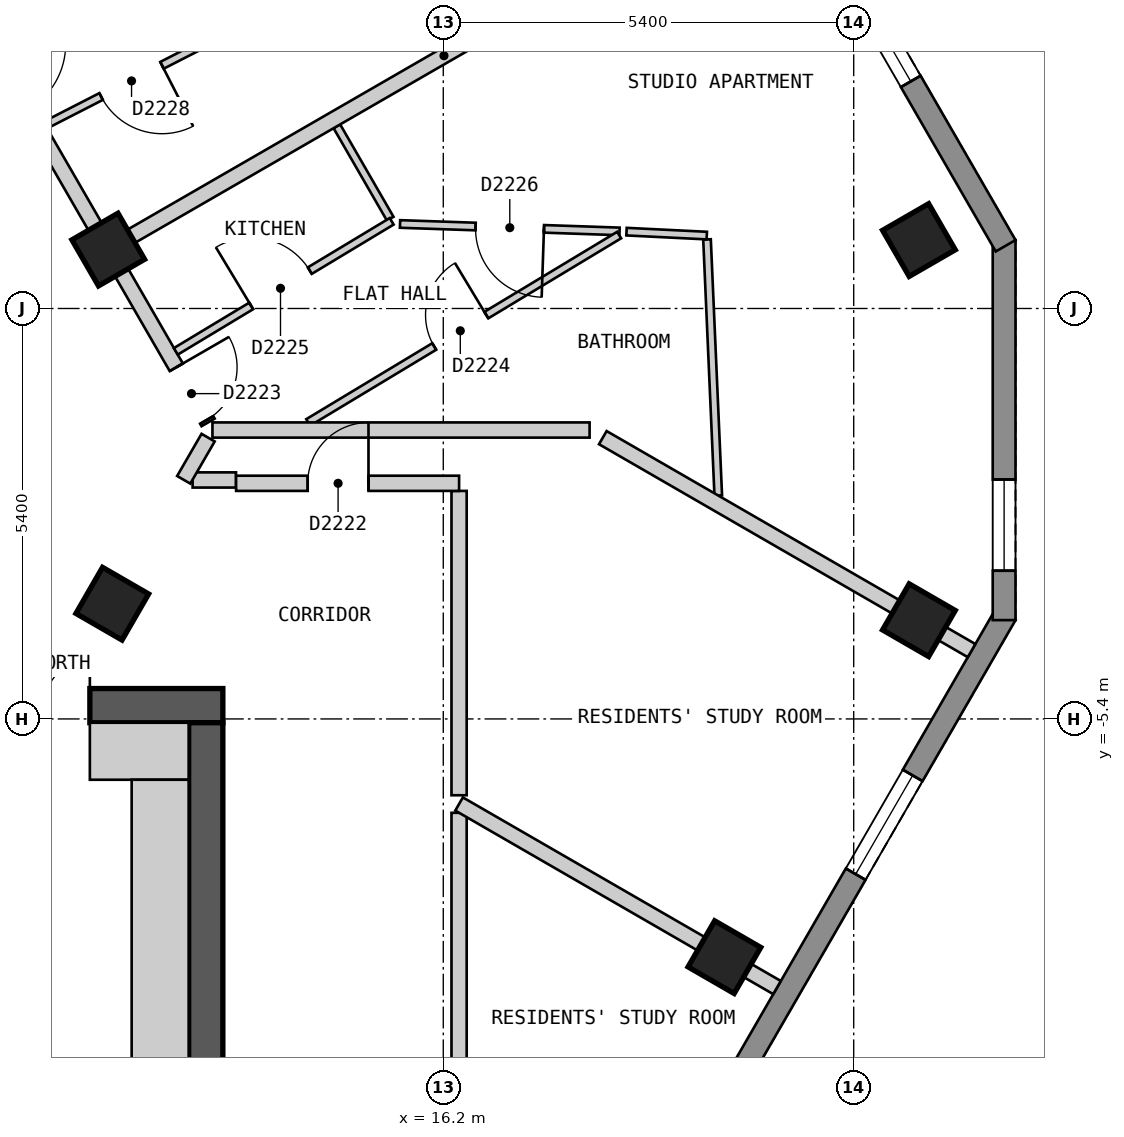
"""IFC4 building model, lengths in metres.
Left out: names, types, materials, properties, quantities, classifications, styles, units other than length and angle.
Written with IfcOpenShell. Run it as: python <this file> out.ifc"""

import sys

from ifc_helpers import new_model, si_unit, direction, frame, frame_2d, origin, origin_2d, place, context, subcontext, project, spatial, polyline, rectangle, outline, extrude, element, fill, save


model = new_model("IFC4")
c1 = context("Model", 3, precision=1e-05, world=origin(), true_north=direction((0.0, 1.0)))
c2 = subcontext(c1, "Body", "Model", "MODEL_VIEW")
j1 = project(units=[si_unit("LENGTHUNIT", "METRE"), si_unit("PLANEANGLEUNIT", "RADIAN")], contexts=[c1])
p1 = place(None, origin())
s1 = spatial("IfcSite", under=j1, at=p1, CompositionType="ELEMENT")
p2 = place(p1, origin())
s2 = spatial("IfcBuilding", under=s1, at=p2, CompositionType="ELEMENT")
p3 = place(p2, frame((0.0, 0.0, 235.8)))
s3 = spatial("IfcBuildingStorey", under=s2, at=p3, CompositionType="ELEMENT", Elevation=235.8)
for number, where, z_axis, x_axis in (
    (1, (19.899, -8.534, 0.0), (0.0, 0.0, 1.0), (0.5, 0.866, 0.0)),
    (2, (22.458, -4.101, 0.0), (0.0, 0.0, 1.0), (0.5, 0.866, 0.0)),
    (3, (22.458, 0.9, 0.0), (0.0, 0.0, 1.0), (-0.5, 0.866, 0.0)),
    (4, (11.845, -3.884, 0.0), (0.0, 0.0, 1.0), (0.5, 0.866, 0.0)),
    (5, (11.792, 0.775, 0.0), (0.0, 0.0, 1.0), (-0.5, 0.866, 0.0)),
):
    element("IfcColumn", number, at=place(p3, frame(where, z_axis=z_axis, x_axis=x_axis)), inside=s3, PredefinedType="COLUMN", context=c2, shape_type="SweptSolid", body=[
        extrude(rectangle(XDim=0.7, YDim=0.7, at=origin_2d()), origin(), (0.0, 0.0, 1.0), 3.0),
    ])
p4 = place(p3, frame((-13.3, -5.225, 0.0), z_axis=(0.0, 0.0, 1.0), x_axis=(1.0, 0.0, 0.0)))
e6 = element("IfcWall", 6, at=p4, inside=s3, PredefinedType="SHEAR", context=c2, shape_type="SweptSolid", body=[
    extrude(rectangle(XDim=26.6, YDim=0.45, at=frame_2d((13.3, 0.0))), origin(), (0.0, 0.0, 1.0), 2.7),
])
p5 = place(p4, frame((23.65, 0.0, 0.0)))
e7 = element("IfcOpeningElement", 7, at=p5, cuts=e6, PredefinedType="OPENING", context=c2, shape_type="SweptSolid", body=[
    extrude(rectangle(XDim=1.2, YDim=2.1, at=frame_2d((0.6, 1.05))), frame((0.0, 0.235, 0.0), z_axis=(0.0, -1.0, 0.0), x_axis=(1.0, 0.0, 0.0)), (0.0, 0.0, 1.0), 0.47),
])
p6 = place(p3, frame((13.075, -18.55, 0.0), z_axis=(0.0, 0.0, 1.0), x_axis=(0.0, 1.0, 0.0)))
e8 = element("IfcWall", 8, at=p6, inside=s3, PredefinedType="SHEAR", context=c2, shape_type="SweptSolid", body=[
    extrude(rectangle(XDim=13.1, YDim=0.45, at=frame_2d((6.55, 0.0))), origin(), (0.0, 0.0, 1.0), 2.7),
])
p7 = place(p3, frame((15.285, -18.425, 0.0), z_axis=(0.0, 0.0, 1.0), x_axis=(0.500012653391, 0.866018098222, 0.0)))
e9 = element("IfcWall", 9, at=p7, inside=s3, PredefinedType="SOLIDWALL", context=c2, shape_type="SweptSolid", body=[
    extrude(outline(polyline([(0.0, -0.15), (16.628, -0.15), (16.548, 0.15), (0.08, 0.15), (0.0, -0.15)])), origin(), (0.0, 0.0, 1.0), 2.7),
])
p8 = place(p7, frame((2.444, 0.0, 0.15)))
e10 = element("IfcOpeningElement", 10, at=p8, cuts=e9, PredefinedType="OPENING", context=c2, shape_type="SweptSolid", body=[
    extrude(rectangle(XDim=1.5, YDim=2.1, at=frame_2d((0.75, 1.05))), frame((0.0, 0.16, 0.0), z_axis=(0.0, -1.0, 0.0), x_axis=(1.0, 0.0, 0.0)), (0.0, 0.0, 1.0), 0.32),
])
p9 = place(p7, frame((7.564, 0.0, 0.15)))
e11 = element("IfcOpeningElement", 11, at=p9, cuts=e9, PredefinedType="OPENING", context=c2, shape_type="SweptSolid", body=[
    extrude(rectangle(XDim=1.5, YDim=2.1, at=frame_2d((0.75, 1.05))), frame((0.0, 0.16, 0.0), z_axis=(0.0, -1.0, 0.0), x_axis=(1.0, 0.0, 0.0)), (0.0, 0.0, 1.0), 0.32),
])
p10 = place(p7, frame((12.682, 0.0, 0.15)))
e12 = element("IfcOpeningElement", 12, at=p10, cuts=e9, PredefinedType="OPENING", context=c2, shape_type="SweptSolid", body=[
    extrude(rectangle(XDim=1.5, YDim=2.1, at=frame_2d((0.75, 1.05))), frame((0.0, 0.16, 0.0), z_axis=(0.0, -1.0, 0.0), x_axis=(1.0, 0.0, 0.0)), (0.0, 0.0, 1.0), 0.32),
])
p11 = place(p3, frame((23.579, -4.1, 0.0), z_axis=(0.0, 0.0, 1.0), x_axis=(0.0, 1.0, 0.0)))
e13 = element("IfcWall", 13, at=p11, inside=s3, PredefinedType="SOLIDWALL", context=c2, shape_type="SweptSolid", body=[
    extrude(outline(polyline([(0.0, -0.15), (5.0, -0.15), (4.92, 0.15), (0.08, 0.15), (0.0, -0.15)])), origin(), (0.0, 0.0, 1.0), 2.7),
])
p12 = place(p11, frame((0.65, 0.0, 0.15)))
e14 = element("IfcOpeningElement", 14, at=p12, cuts=e13, PredefinedType="OPENING", context=c2, shape_type="SweptSolid", body=[
    extrude(rectangle(XDim=1.2, YDim=2.1, at=frame_2d((0.6, 1.05))), frame((0.0, 0.16, 0.0), z_axis=(0.0, -1.0, 0.0), x_axis=(1.0, 0.0, 0.0)), (0.0, 0.0, 1.0), 0.32),
])
p13 = place(p3, frame((23.599, 0.825, 0.0), z_axis=(0.0, 0.0, 1.0), x_axis=(-0.500003656944, 0.866023292436, 0.0)))
e15 = element("IfcWall", 15, at=p13, inside=s3, PredefinedType="SOLIDWALL", context=c2, shape_type="SweptSolid", body=[
    extrude(outline(polyline([(0.0, -0.15), (22.17, -0.15), (22.09, 0.15), (0.08, 0.15), (0.0, -0.15)])), origin(), (0.0, 0.0, 1.0), 2.7),
])
p14 = place(p13, frame((2.497, 0.0, 0.15)))
e16 = element("IfcOpeningElement", 16, at=p14, cuts=e15, PredefinedType="OPENING", context=c2, shape_type="SweptSolid", body=[
    extrude(rectangle(XDim=1.5, YDim=2.1, at=frame_2d((0.75, 1.05))), frame((0.0, 0.16, 0.0), z_axis=(0.0, -1.0, 0.0), x_axis=(1.0, 0.0, 0.0)), (0.0, 0.0, 1.0), 0.32),
])
p15 = place(p13, frame((7.723, 0.0, 0.15)))
e17 = element("IfcOpeningElement", 17, at=p15, cuts=e15, PredefinedType="OPENING", context=c2, shape_type="SweptSolid", body=[
    extrude(rectangle(XDim=1.5, YDim=2.1, at=frame_2d((0.75, 1.05))), frame((0.0, 0.16, 0.0), z_axis=(0.0, -1.0, 0.0), x_axis=(1.0, 0.0, 0.0)), (0.0, 0.0, 1.0), 0.32),
])
p16 = place(p13, frame((12.948, 0.0, 0.15)))
e18 = element("IfcOpeningElement", 18, at=p16, cuts=e15, PredefinedType="OPENING", context=c2, shape_type="SweptSolid", body=[
    extrude(rectangle(XDim=1.5, YDim=2.1, at=frame_2d((0.75, 1.05))), frame((0.0, 0.16, 0.0), z_axis=(0.0, -1.0, 0.0), x_axis=(1.0, 0.0, 0.0)), (0.0, 0.0, 1.0), 0.32),
])
p17 = place(p13, frame((18.173, 0.0, 0.15)))
e19 = element("IfcOpeningElement", 19, at=p17, cuts=e15, PredefinedType="OPENING", context=c2, shape_type="SweptSolid", body=[
    extrude(rectangle(XDim=1.5, YDim=2.1, at=frame_2d((0.75, 1.05))), frame((0.0, 0.16, 0.0), z_axis=(0.0, -1.0, 0.0), x_axis=(1.0, 0.0, 0.0)), (0.0, 0.0, 1.0), 0.32),
])
p18 = place(p3, frame((9.238, 5.2, 0.0), z_axis=(0.0, 0.0, 1.0), x_axis=(0.500025705601, -0.86601056214, 0.0)))
e20 = element("IfcWall", 20, at=p18, inside=s3, PredefinedType="PARTITIONING", context=c2, shape_type="SweptSolid", body=[
    extrude(rectangle(XDim=7.735, YDim=0.2, at=frame_2d((3.868, 0.0))), origin(), (0.0, 0.0, 1.0), 2.7),
])
p19 = place(p18, frame((6.898, 0.0, 0.0)))
e21 = element("IfcOpeningElement", 21, at=p19, cuts=e20, PredefinedType="OPENING", context=c2, shape_type="SweptSolid", body=[
    extrude(rectangle(XDim=0.8, YDim=2.1, at=frame_2d((0.4, 1.05))), frame((0.0, 0.11, 0.0), z_axis=(0.0, -1.0, 0.0), x_axis=(1.0, 0.0, 0.0)), (0.0, 0.0, 1.0), 0.22),
])
p20 = place(p18, frame((1.988, 0.0, 0.0)))
e22 = element("IfcOpeningElement", 22, at=p20, cuts=e20, PredefinedType="OPENING", context=c2, shape_type="SweptSolid", body=[
    extrude(rectangle(XDim=1.0, YDim=2.1, at=frame_2d((0.5, 1.05))), frame((0.0, 0.11, 0.0), z_axis=(0.0, -1.0, 0.0), x_axis=(1.0, 0.0, 0.0)), (0.0, 0.0, 1.0), 0.22),
])
p21 = place(p3, frame((16.408, -2.4, 0.0), z_axis=(0.0, 0.0, 1.0), x_axis=(0.0, -1.0, 0.0)))
e23 = element("IfcWall", 23, at=p21, inside=s3, PredefinedType="PARTITIONING", context=c2, shape_type="SweptSolid", body=[
    extrude(rectangle(XDim=4.004, YDim=0.2, at=frame_2d((2.002, 0.0))), origin(), (0.0, 0.0, 1.0), 2.7),
])
p22 = place(p3, frame((12.902, -2.256, 0.0), z_axis=(0.0, 0.0, 1.0), x_axis=(1.0, 0.0, 0.0)))
e24 = element("IfcWall", 24, at=p22, inside=s3, PredefinedType="PARTITIONING", context=c2, shape_type="SweptSolid", body=[
    extrude(rectangle(XDim=0.571, YDim=0.2, at=frame_2d((0.285, 0.0))), origin(), (0.0, 0.0, 1.0), 2.7),
])
p23 = place(p3, frame((13.474, -2.3, 0.0), z_axis=(0.0, 0.0, 1.0), x_axis=(1.0, 0.0, 0.0)))
e25 = element("IfcWall", 25, at=p23, inside=s3, PredefinedType="PARTITIONING", context=c2, shape_type="SweptSolid", body=[
    extrude(rectangle(XDim=2.934, YDim=0.2, at=frame_2d((1.467, 0.0))), origin(), (0.0, 0.0, 1.0), 2.7),
])
p24 = place(p23, frame((0.942, 0.0, 0.0)))
e26 = element("IfcOpeningElement", 26, at=p24, cuts=e25, PredefinedType="OPENING", context=c2, shape_type="SweptSolid", body=[
    extrude(rectangle(XDim=0.8, YDim=2.1, at=frame_2d((0.4, 1.05))), frame((0.0, 0.11, 0.0), z_axis=(0.0, -1.0, 0.0), x_axis=(1.0, 0.0, 0.0)), (0.0, 0.0, 1.0), 0.22),
])
p25 = place(p3, frame((12.785, -2.254, 0.0), z_axis=(0.0, 0.0, 1.0), x_axis=(0.500766044352, 0.865582675903, 0.0)))
e27 = element("IfcWall", 27, at=p25, inside=s3, PredefinedType="PARTITIONING", context=c2, shape_type="SweptSolid", body=[
    extrude(rectangle(XDim=0.641, YDim=0.2, at=frame_2d((0.321, 0.0))), origin(), (0.0, 0.0, 1.0), 2.7),
])
p26 = place(p3, frame((16.408, -16.179, 0.0), z_axis=(0.0, 0.0, 1.0), x_axis=(0.0, 1.0, 0.0)))
e28 = element("IfcWall", 28, at=p26, inside=s3, PredefinedType="PARTITIONING", context=c2, shape_type="SweptSolid", body=[
    extrude(rectangle(XDim=9.544, YDim=0.2, at=frame_2d((4.772, 0.0))), origin(), (0.0, 0.0, 1.0), 2.7),
])
p27 = place(p26, frame((4.358, 0.0, 0.0)))
e29 = element("IfcOpeningElement", 29, at=p27, cuts=e28, PredefinedType="OPENING", context=c2, shape_type="SweptSolid", body=[
    extrude(rectangle(XDim=0.8, YDim=2.1, at=frame_2d((0.4, 1.05))), frame((0.0, 0.11, 0.0), z_axis=(0.0, -1.0, 0.0), x_axis=(1.0, 0.0, 0.0)), (0.0, 0.0, 1.0), 0.22),
])
p28 = place(p3, frame((14.8, 2.397, 0.0), z_axis=(0.0, 0.0, 1.0), x_axis=(0.49989805765, -0.866084252228, 0.0)))
e30 = element("IfcWall", 30, at=p28, inside=s3, PredefinedType="PARTITIONING", context=c2, shape_type="SweptSolid", body=[
    extrude(rectangle(XDim=1.404, YDim=0.1, at=frame_2d((0.702, 0.0))), origin(), (0.0, 0.0, 1.0), 2.7),
])
p29 = place(p3, frame((19.67, 0.909, 0.0), z_axis=(0.0, 0.0, 1.0), x_axis=(0.043933486644, -0.99903445824, 0.0)))
e31 = element("IfcWall", 31, at=p29, inside=s3, PredefinedType="PARTITIONING", context=c2, shape_type="SweptSolid", body=[
    extrude(rectangle(XDim=3.373, YDim=0.1, at=frame_2d((1.687, 0.0))), origin(), (0.0, 0.0, 1.0), 2.7),
])
p30 = place(p3, frame((15.631, 1.112, 0.0), z_axis=(0.0, 0.0, 1.0), x_axis=(0.999423034213, -0.033964668168, 0.0)))
e32 = element("IfcWall", 32, at=p30, inside=s3, PredefinedType="PARTITIONING", context=c2, shape_type="SweptSolid", body=[
    extrude(rectangle(XDim=2.89, YDim=0.1, at=frame_2d((1.445, 0.0))), origin(), (0.0, 0.0, 1.0), 2.7),
])
p31 = place(p30, frame((0.995, 0.0, 0.0)))
e33 = element("IfcOpeningElement", 33, at=p31, cuts=e32, PredefinedType="OPENING", context=c2, shape_type="SweptSolid", body=[
    extrude(rectangle(XDim=0.9, YDim=2.1, at=frame_2d((0.45, 1.05))), frame((0.0, 0.06, 0.0), z_axis=(0.0, -1.0, 0.0), x_axis=(1.0, 0.0, 0.0)), (0.0, 0.0, 1.0), 0.12),
])
p32 = place(p3, frame((10.963, 2.412, 0.0), z_axis=(0.0, 0.0, 1.0), x_axis=(0.889943997558, 0.456069820543, 0.0)))
e34 = element("IfcWall", 34, at=p32, inside=s3, PredefinedType="PARTITIONING", context=c2, shape_type="SweptSolid", body=[
    extrude(rectangle(XDim=2.651, YDim=0.1, at=frame_2d((1.325, 0.0))), origin(), (0.0, 0.0, 1.0), 2.7),
])
p33 = place(p32, frame((0.826, 0.0, 0.0)))
e35 = element("IfcOpeningElement", 35, at=p33, cuts=e34, PredefinedType="OPENING", context=c2, shape_type="SweptSolid", body=[
    extrude(rectangle(XDim=0.9, YDim=2.1, at=frame_2d((0.45, 1.05))), frame((0.0, 0.06, 0.0), z_axis=(0.0, -1.0, 0.0), x_axis=(1.0, 0.0, 0.0)), (0.0, 0.0, 1.0), 0.12),
])
p34 = place(p3, frame((12.681, -0.564, 0.0), z_axis=(0.0, 0.0, 1.0), x_axis=(0.856575482301, 0.516021746752, 0.0)))
e36 = element("IfcWall", 36, at=p34, inside=s3, PredefinedType="PARTITIONING", context=c2, shape_type="SweptSolid", body=[
    extrude(rectangle(XDim=3.316, YDim=0.1, at=frame_2d((1.658, 0.0))), origin(), (0.0, 0.0, 1.0), 2.7),
])
p35 = place(p34, frame((1.158, 0.0, 0.0)))
e37 = element("IfcOpeningElement", 37, at=p35, cuts=e36, PredefinedType="OPENING", context=c2, shape_type="SweptSolid", body=[
    extrude(rectangle(XDim=0.9, YDim=2.1, at=frame_2d((0.45, 1.05))), frame((0.0, 0.06, 0.0), z_axis=(0.0, -1.0, 0.0), x_axis=(1.0, 0.0, 0.0)), (0.0, 0.0, 1.0), 0.12),
])
p36 = place(p3, frame((14.423, -1.499, 0.0), z_axis=(0.0, 0.0, 1.0), x_axis=(0.856512638305, 0.516126050905, 0.0)))
e38 = element("IfcWall", 38, at=p36, inside=s3, PredefinedType="PARTITIONING", context=c2, shape_type="SweptSolid", body=[
    extrude(rectangle(XDim=4.776, YDim=0.1, at=frame_2d((2.388, 0.0))), origin(), (0.0, 0.0, 1.0), 2.7),
])
p37 = place(p36, frame((1.936, 0.0, 0.0)))
e39 = element("IfcOpeningElement", 39, at=p37, cuts=e38, PredefinedType="OPENING", context=c2, shape_type="SweptSolid", body=[
    extrude(rectangle(XDim=0.8, YDim=2.1, at=frame_2d((0.4, 1.05))), frame((0.0, 0.06, 0.0), z_axis=(0.0, -1.0, 0.0), x_axis=(1.0, 0.0, 0.0)), (0.0, 0.0, 1.0), 0.12),
])
p38 = place(p3, frame((18.299, -1.699, 0.0), z_axis=(0.0, 0.0, 1.0), x_axis=(0.865962789554, -0.50010843535, 0.0)))
e40 = element("IfcWall", 40, at=p38, inside=s3, PredefinedType="PARTITIONING", context=c2, shape_type="SweptSolid", body=[
    extrude(rectangle(XDim=5.603, YDim=0.2, at=frame_2d((2.801, 0.0))), origin(), (0.0, 0.0, 1.0), 2.7),
])
p39 = place(p3, frame((16.408, -6.519, 0.0), z_axis=(0.0, 0.0, 1.0), x_axis=(0.866032396701, -0.499987887718, 0.0)))
e41 = element("IfcWall", 41, at=p39, inside=s3, PredefinedType="PARTITIONING", context=c2, shape_type="SweptSolid", body=[
    extrude(rectangle(XDim=4.83, YDim=0.2, at=frame_2d((2.415, 0.0))), origin(), (0.0, 0.0, 1.0), 2.7),
])
p40 = place(p3, frame((13.163, -1.599, 0.0), z_axis=(0.0, 0.0, 1.0), x_axis=(1.0, 0.0, 0.0)))
e42 = element("IfcWall", 42, at=p40, inside=s3, PredefinedType="PARTITIONING", context=c2, shape_type="SweptSolid", body=[
    extrude(rectangle(XDim=4.962, YDim=0.2, at=frame_2d((2.481, 0.0))), origin(), (0.0, 0.0, 1.0), 2.7),
])
p41 = place(p3, frame((11.879, 0.826, 0.0), z_axis=(0.0, 0.0, 1.0), x_axis=(0.866065245018, 0.499930986609, 0.0)))
e43 = element("IfcWall", 43, at=p41, inside=s3, PredefinedType="PARTITIONING", context=c2, shape_type="SweptSolid", body=[
    extrude(rectangle(XDim=10.0, YDim=0.2, at=frame_2d((5.0, 0.0))), origin(), (0.0, 0.0, 1.0), 2.7),
])
p42 = place(p3, frame((18.611, 1.011, 0.0), z_axis=(0.0, 0.0, 1.0), x_axis=(0.998789491469, -0.049188939117, 0.0)))
e44 = element("IfcWall", 44, at=p42, inside=s3, PredefinedType="PARTITIONING", context=c2, shape_type="SweptSolid", body=[
    extrude(rectangle(XDim=1.057, YDim=0.1, at=frame_2d((0.529, 0.0))), origin(), (0.0, 0.0, 1.0), 2.7),
])
p43 = place(p3, frame((11.55, -5.825, 0.0), z_axis=(0.0, 0.0, 1.0), x_axis=(1.0, 0.0, 0.0)))
e45 = element("IfcWall", 45, at=p43, inside=s3, PredefinedType="PARTITIONING", context=c2, shape_type="SweptSolid", body=[
    extrude(rectangle(XDim=1.3, YDim=0.75, at=frame_2d((0.65, 0.0))), origin(), (0.0, 0.0, 1.0), 2.7),
])
p44 = place(p3, frame((12.475, -14.45, 0.0), z_axis=(0.0, 0.0, 1.0), x_axis=(0.0, 1.0, 0.0)))
e46 = element("IfcWall", 46, at=p44, inside=s3, PredefinedType="PARTITIONING", context=c2, shape_type="SweptSolid", body=[
    extrude(rectangle(XDim=8.25, YDim=0.75, at=frame_2d((4.125, 0.0))), origin(), (0.0, 0.0, 1.0), 2.7),
])
p45 = place(p10, origin())
e47 = element("IfcWindow", 47, at=p45, inside=s3, PartitioningType="SINGLE_PANEL", PredefinedType="WINDOW", context=c2, shape_type="SweptSolid", body=[
    extrude(rectangle(XDim=1.5, YDim=2.1, at=frame_2d((0.75, 1.05))), frame((0.0, 0.03, 0.0), z_axis=(0.0, -1.0, 0.0), x_axis=(1.0, 0.0, 0.0)), (0.0, 0.0, 1.0), 0.06),
])
fill(e12, e47)
p46 = place(p12, origin())
e48 = element("IfcWindow", 48, at=p46, inside=s3, PartitioningType="SINGLE_PANEL", PredefinedType="WINDOW", context=c2, shape_type="SweptSolid", body=[
    extrude(rectangle(XDim=1.2, YDim=2.1, at=frame_2d((0.6, 1.05))), frame((0.0, 0.03, 0.0), z_axis=(0.0, -1.0, 0.0), x_axis=(1.0, 0.0, 0.0)), (0.0, 0.0, 1.0), 0.06),
])
fill(e14, e48)
p47 = place(p14, origin())
e49 = element("IfcWindow", 49, at=p47, inside=s3, PartitioningType="SINGLE_PANEL", PredefinedType="WINDOW", context=c2, shape_type="SweptSolid", body=[
    extrude(rectangle(XDim=1.5, YDim=2.1, at=frame_2d((0.75, 1.05))), frame((0.0, 0.03, 0.0), z_axis=(0.0, -1.0, 0.0), x_axis=(1.0, 0.0, 0.0)), (0.0, 0.0, 1.0), 0.06),
])
fill(e16, e49)
p48 = place(p24, origin())
e50 = element("IfcDoor", 50, at=p48, inside=s3, OperationType="SINGLE_SWING_RIGHT", PredefinedType="DOOR", context=c2, shape_type="SweptSolid", body=[
    extrude(rectangle(XDim=0.8, YDim=2.1, at=frame_2d((0.4, 1.05))), frame((0.0, 0.025, 0.0), z_axis=(0.0, -1.0, 0.0), x_axis=(1.0, 0.0, 0.0)), (0.0, 0.0, 1.0), 0.05),
])
fill(e26, e50)
p49 = place(p19, origin())
e51 = element("IfcDoor", 51, at=p49, inside=s3, OperationType="SINGLE_SWING_LEFT", PredefinedType="DOOR", context=c2, shape_type="SweptSolid", body=[
    extrude(rectangle(XDim=0.8, YDim=2.1, at=frame_2d((0.4, 1.05))), frame((0.0, 0.025, 0.0), z_axis=(0.0, -1.0, 0.0), x_axis=(1.0, 0.0, 0.0)), (0.0, 0.0, 1.0), 0.05),
])
fill(e21, e51)
p50 = place(p37, origin())
e52 = element("IfcDoor", 52, at=p50, inside=s3, OperationType="SINGLE_SWING_RIGHT", PredefinedType="DOOR", context=c2, shape_type="SweptSolid", body=[
    extrude(rectangle(XDim=0.8, YDim=2.1, at=frame_2d((0.4, 1.05))), frame((0.0, 0.025, 0.0), z_axis=(0.0, -1.0, 0.0), x_axis=(1.0, 0.0, 0.0)), (0.0, 0.0, 1.0), 0.05),
])
fill(e39, e52)
p51 = place(p35, origin())
e53 = element("IfcDoor", 53, at=p51, inside=s3, OperationType="SINGLE_SWING_LEFT", PredefinedType="DOOR", context=c2, shape_type="SweptSolid", body=[
    extrude(rectangle(XDim=0.9, YDim=2.1, at=frame_2d((0.45, 1.05))), frame((0.0, 0.025, 0.0), z_axis=(0.0, -1.0, 0.0), x_axis=(1.0, 0.0, 0.0)), (0.0, 0.0, 1.0), 0.05),
])
fill(e37, e53)
p52 = place(p31, origin())
e54 = element("IfcDoor", 54, at=p52, inside=s3, OperationType="SINGLE_SWING_RIGHT", PredefinedType="DOOR", context=c2, shape_type="SweptSolid", body=[
    extrude(rectangle(XDim=0.9, YDim=2.1, at=frame_2d((0.45, 1.05))), frame((0.0, 0.025, 0.0), z_axis=(0.0, -1.0, 0.0), x_axis=(1.0, 0.0, 0.0)), (0.0, 0.0, 1.0), 0.05),
])
fill(e33, e54)
p53 = place(p33, origin())
e55 = element("IfcDoor", 55, at=p53, inside=s3, OperationType="SINGLE_SWING_RIGHT", PredefinedType="DOOR", context=c2, shape_type="SweptSolid", body=[
    extrude(rectangle(XDim=0.9, YDim=2.1, at=frame_2d((0.45, 1.05))), frame((0.0, 0.025, 0.0), z_axis=(0.0, -1.0, 0.0), x_axis=(1.0, 0.0, 0.0)), (0.0, 0.0, 1.0), 0.05),
])
fill(e35, e55)
p54 = place(p5, origin())
e56 = element("IfcDoor", 56, at=p54, inside=s3, OperationType="DOUBLE_DOOR_SINGLE_SWING", PredefinedType="DOOR", context=c2, shape_type="SweptSolid", body=[
    extrude(rectangle(XDim=1.2, YDim=2.1, at=frame_2d((0.6, 1.05))), frame((0.0, 0.025, 0.0), z_axis=(0.0, -1.0, 0.0), x_axis=(1.0, 0.0, 0.0)), (0.0, 0.0, 1.0), 0.05),
])
fill(e7, e56)
save(model, sys.argv[1])
